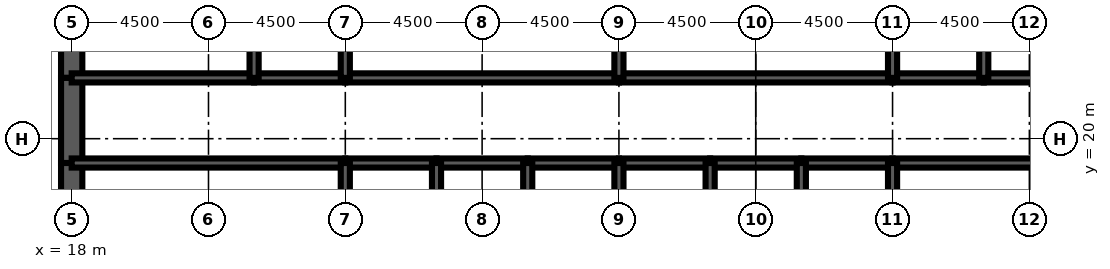
"""IFC4 building model, lengths in metres.
Left out: names, types, materials, properties, quantities, classifications, styles, units other than length and angle.
Written with IfcOpenShell. Run it as: python <this file> out.ifc"""

import sys

from ifc_helpers import new_model, si_unit, direction, frame, frame_2d, origin, place, context, subcontext, project, spatial, rectangle, extrude, element, fill, save


model = new_model("IFC4")
c1 = context("Model", 3, precision=1e-05, world=origin(), true_north=direction((0.0, 1.0)))
c2 = subcontext(c1, "Body", "Model", "MODEL_VIEW")
j1 = project(units=[si_unit("LENGTHUNIT", "METRE"), si_unit("PLANEANGLEUNIT", "RADIAN")], contexts=[c1])
p1 = place(None, origin())
s1 = spatial("IfcSite", under=j1, at=p1, CompositionType="ELEMENT")
p2 = place(p1, origin())
s2 = spatial("IfcBuilding", under=s1, at=p2, CompositionType="ELEMENT")
p3 = place(p2, frame((0.0, 0.0, 300.5)))
s3 = spatial("IfcBuildingStorey", under=s2, at=p3, CompositionType="ELEMENT", Elevation=300.5)
p4 = place(p3, frame((18.0, 26.0, 0.0), z_axis=(0.0, 0.0, 1.0), x_axis=(0.0, -1.0, 0.0)))
e1 = element("IfcWall", 1, at=p4, inside=s3, PredefinedType="SHEAR", context=c2, shape_type="SweptSolid", body=[
    extrude(rectangle(XDim=4.0, YDim=0.7, at=frame_2d((2.0, 0.0))), origin(), (0.0, 0.0, 1.0), 4.2),
])
p5 = place(p3, frame((18.0, 22.0, 0.0), z_axis=(0.0, 0.0, 1.0), x_axis=(0.0, -1.0, 0.0)))
e2 = element("IfcWall", 2, at=p5, inside=s3, PredefinedType="SHEAR", context=c2, shape_type="SweptSolid", body=[
    extrude(rectangle(XDim=2.8, YDim=0.7, at=frame_2d((1.4, 0.0))), origin(), (0.0, 0.0, 1.0), 4.2),
])
p6 = place(p5, frame((0.6, 0.0, 0.0)))
e3 = element("IfcOpeningElement", 3, at=p6, cuts=e2, PredefinedType="OPENING", context=c2, shape_type="SweptSolid", body=[
    extrude(rectangle(XDim=1.8, YDim=2.1, at=frame_2d((0.9, 1.05))), frame((0.0, 0.36, 0.0), z_axis=(0.0, -1.0, 0.0), x_axis=(1.0, 0.0, 0.0)), (0.0, 0.0, 1.0), 0.72),
])
p7 = place(p3, frame((18.0, 19.2, 0.0), z_axis=(0.0, 0.0, 1.0), x_axis=(0.0, -1.0, 0.0)))
e4 = element("IfcWall", 4, at=p7, inside=s3, PredefinedType="SHEAR", context=c2, shape_type="SweptSolid", body=[
    extrude(rectangle(XDim=3.2, YDim=0.7, at=frame_2d((1.6, 0.0))), origin(), (0.0, 0.0, 1.0), 4.2),
])
p8 = place(p3, frame((18.0, 19.2, 0.0), z_axis=(0.0, 0.0, 1.0), x_axis=(1.0, 0.0, 0.0)))
e5 = element("IfcWall", 5, at=p8, inside=s3, PredefinedType="SOLIDWALL", context=c2, shape_type="SweptSolid", body=[
    extrude(rectangle(XDim=9.0, YDim=0.3, at=frame_2d((4.5, 0.0))), origin(), (0.0, 0.0, 1.0), 4.2),
])
p9 = place(p8, frame((0.65, 0.0, 0.0)))
e6 = element("IfcOpeningElement", 6, at=p9, cuts=e5, PredefinedType="OPENING", context=c2, shape_type="SweptSolid", body=[
    extrude(rectangle(XDim=1.0, YDim=2.1, at=frame_2d((0.5, 1.05))), frame((0.0, 0.16, 0.0), z_axis=(0.0, -1.0, 0.0), x_axis=(1.0, 0.0, 0.0)), (0.0, 0.0, 1.0), 0.32),
])
p10 = place(p3, frame((27.0, 19.2, 0.0), z_axis=(0.0, 0.0, 1.0), x_axis=(1.0, 0.0, 0.0)))
e7 = element("IfcWall", 7, at=p10, inside=s3, PredefinedType="SOLIDWALL", context=c2, shape_type="SweptSolid", body=[
    extrude(rectangle(XDim=3.0, YDim=0.3, at=frame_2d((1.5, 0.0))), origin(), (0.0, 0.0, 1.0), 4.2),
])
p11 = place(p10, frame((0.95, 0.0, 0.0)))
e8 = element("IfcOpeningElement", 8, at=p11, cuts=e7, PredefinedType="OPENING", context=c2, shape_type="SweptSolid", body=[
    extrude(rectangle(XDim=1.1, YDim=2.2, at=frame_2d((0.55, 1.1))), frame((0.0, 0.16, 0.0), z_axis=(0.0, -1.0, 0.0), x_axis=(1.0, 0.0, 0.0)), (0.0, 0.0, 1.0), 0.32),
])
p12 = place(p3, frame((30.0, 19.2, 0.0), z_axis=(0.0, 0.0, 1.0), x_axis=(1.0, 0.0, 0.0)))
e9 = element("IfcWall", 9, at=p12, inside=s3, PredefinedType="SOLIDWALL", context=c2, shape_type="SweptSolid", body=[
    extrude(rectangle(XDim=3.0, YDim=0.3, at=frame_2d((1.5, 0.0))), origin(), (0.0, 0.0, 1.0), 4.2),
])
p13 = place(p12, frame((0.95, 0.0, 0.0)))
e10 = element("IfcOpeningElement", 10, at=p13, cuts=e9, PredefinedType="OPENING", context=c2, shape_type="SweptSolid", body=[
    extrude(rectangle(XDim=1.1, YDim=2.2, at=frame_2d((0.55, 1.1))), frame((0.0, 0.16, 0.0), z_axis=(0.0, -1.0, 0.0), x_axis=(1.0, 0.0, 0.0)), (0.0, 0.0, 1.0), 0.32),
])
p14 = place(p3, frame((33.0, 19.2, 0.0), z_axis=(0.0, 0.0, 1.0), x_axis=(1.0, 0.0, 0.0)))
e11 = element("IfcWall", 11, at=p14, inside=s3, PredefinedType="SOLIDWALL", context=c2, shape_type="SweptSolid", body=[
    extrude(rectangle(XDim=3.0, YDim=0.3, at=frame_2d((1.5, 0.0))), origin(), (0.0, 0.0, 1.0), 4.2),
])
p15 = place(p14, frame((0.95, 0.0, 0.0)))
e12 = element("IfcOpeningElement", 12, at=p15, cuts=e11, PredefinedType="OPENING", context=c2, shape_type="SweptSolid", body=[
    extrude(rectangle(XDim=1.1, YDim=2.2, at=frame_2d((0.55, 1.1))), frame((0.0, 0.16, 0.0), z_axis=(0.0, -1.0, 0.0), x_axis=(1.0, 0.0, 0.0)), (0.0, 0.0, 1.0), 0.32),
])
p16 = place(p3, frame((36.0, 19.2, 0.0), z_axis=(0.0, 0.0, 1.0), x_axis=(1.0, 0.0, 0.0)))
e13 = element("IfcWall", 13, at=p16, inside=s3, PredefinedType="SOLIDWALL", context=c2, shape_type="SweptSolid", body=[
    extrude(rectangle(XDim=3.0, YDim=0.3, at=frame_2d((1.5, 0.0))), origin(), (0.0, 0.0, 1.0), 4.2),
])
p17 = place(p16, frame((0.95, 0.0, 0.0)))
e14 = element("IfcOpeningElement", 14, at=p17, cuts=e13, PredefinedType="OPENING", context=c2, shape_type="SweptSolid", body=[
    extrude(rectangle(XDim=1.1, YDim=2.2, at=frame_2d((0.55, 1.1))), frame((0.0, 0.16, 0.0), z_axis=(0.0, -1.0, 0.0), x_axis=(1.0, 0.0, 0.0)), (0.0, 0.0, 1.0), 0.32),
])
p18 = place(p3, frame((39.0, 19.2, 0.0), z_axis=(0.0, 0.0, 1.0), x_axis=(1.0, 0.0, 0.0)))
e15 = element("IfcWall", 15, at=p18, inside=s3, PredefinedType="SOLIDWALL", context=c2, shape_type="SweptSolid", body=[
    extrude(rectangle(XDim=3.0, YDim=0.3, at=frame_2d((1.5, 0.0))), origin(), (0.0, 0.0, 1.0), 4.2),
])
p19 = place(p18, frame((1.0, 0.0, 0.0)))
e16 = element("IfcOpeningElement", 16, at=p19, cuts=e15, PredefinedType="OPENING", context=c2, shape_type="SweptSolid", body=[
    extrude(rectangle(XDim=1.0, YDim=2.1, at=frame_2d((0.5, 1.05))), frame((0.0, 0.16, 0.0), z_axis=(0.0, -1.0, 0.0), x_axis=(1.0, 0.0, 0.0)), (0.0, 0.0, 1.0), 0.32),
])
p20 = place(p3, frame((42.0, 19.2, 0.0), z_axis=(0.0, 0.0, 1.0), x_axis=(1.0, 0.0, 0.0)))
e17 = element("IfcWall", 17, at=p20, inside=s3, PredefinedType="SOLIDWALL", context=c2, shape_type="SweptSolid", body=[
    extrude(rectangle(XDim=3.0, YDim=0.3, at=frame_2d((1.5, 0.0))), origin(), (0.0, 0.0, 1.0), 4.2),
])
p21 = place(p20, frame((1.0, 0.0, 0.0)))
e18 = element("IfcOpeningElement", 18, at=p21, cuts=e17, PredefinedType="OPENING", context=c2, shape_type="SweptSolid", body=[
    extrude(rectangle(XDim=1.0, YDim=2.1, at=frame_2d((0.5, 1.05))), frame((0.0, 0.16, 0.0), z_axis=(0.0, -1.0, 0.0), x_axis=(1.0, 0.0, 0.0)), (0.0, 0.0, 1.0), 0.32),
])
p22 = place(p3, frame((45.0, 19.2, 0.0), z_axis=(0.0, 0.0, 1.0), x_axis=(1.0, 0.0, 0.0)))
e19 = element("IfcWall", 19, at=p22, inside=s3, PredefinedType="SOLIDWALL", context=c2, shape_type="SweptSolid", body=[
    extrude(rectangle(XDim=9.0, YDim=0.3, at=frame_2d((4.5, 0.0))), origin(), (0.0, 0.0, 1.0), 4.2),
])
p23 = place(p22, frame((7.35, 0.0, 0.0)))
e20 = element("IfcOpeningElement", 20, at=p23, cuts=e19, PredefinedType="OPENING", context=c2, shape_type="SweptSolid", body=[
    extrude(rectangle(XDim=1.0, YDim=2.1, at=frame_2d((0.5, 1.05))), frame((0.0, 0.16, 0.0), z_axis=(0.0, -1.0, 0.0), x_axis=(1.0, 0.0, 0.0)), (0.0, 0.0, 1.0), 0.32),
])
p24 = place(p3, frame((18.0, 22.0, 0.0), z_axis=(0.0, 0.0, 1.0), x_axis=(1.0, 0.0, 0.0)))
e21 = element("IfcWall", 21, at=p24, inside=s3, PredefinedType="SOLIDWALL", context=c2, shape_type="SweptSolid", body=[
    extrude(rectangle(XDim=6.0, YDim=0.3, at=frame_2d((3.0, 0.0))), origin(), (0.0, 0.0, 1.0), 4.2),
])
p25 = place(p24, frame((4.4, 0.0, 0.0)))
e22 = element("IfcOpeningElement", 22, at=p25, cuts=e21, PredefinedType="OPENING", context=c2, shape_type="SweptSolid", body=[
    extrude(rectangle(XDim=1.0, YDim=2.1, at=frame_2d((0.5, 1.05))), frame((0.0, 0.16, 0.0), z_axis=(0.0, -1.0, 0.0), x_axis=(1.0, 0.0, 0.0)), (0.0, 0.0, 1.0), 0.32),
])
p26 = place(p24, frame((0.75, 0.0, 0.0)))
e23 = element("IfcOpeningElement", 23, at=p26, cuts=e21, PredefinedType="OPENING", context=c2, shape_type="SweptSolid", body=[
    extrude(rectangle(XDim=1.0, YDim=2.1, at=frame_2d((0.5, 1.05))), frame((0.0, 0.16, 0.0), z_axis=(0.0, -1.0, 0.0), x_axis=(1.0, 0.0, 0.0)), (0.0, 0.0, 1.0), 0.32),
])
p27 = place(p3, frame((24.0, 22.0, 0.0), z_axis=(0.0, 0.0, 1.0), x_axis=(1.0, 0.0, 0.0)))
e24 = element("IfcWall", 24, at=p27, inside=s3, PredefinedType="SOLIDWALL", context=c2, shape_type="SweptSolid", body=[
    extrude(rectangle(XDim=3.0, YDim=0.3, at=frame_2d((1.5, 0.0))), origin(), (0.0, 0.0, 1.0), 4.2),
])
p28 = place(p27, frame((1.0, 0.0, 0.0)))
e25 = element("IfcOpeningElement", 25, at=p28, cuts=e24, PredefinedType="OPENING", context=c2, shape_type="SweptSolid", body=[
    extrude(rectangle(XDim=1.0, YDim=2.1, at=frame_2d((0.5, 1.05))), frame((0.0, 0.16, 0.0), z_axis=(0.0, -1.0, 0.0), x_axis=(1.0, 0.0, 0.0)), (0.0, 0.0, 1.0), 0.32),
])
p29 = place(p3, frame((27.0, 22.0, 0.0), z_axis=(0.0, 0.0, 1.0), x_axis=(1.0, 0.0, 0.0)))
e26 = element("IfcWall", 26, at=p29, inside=s3, PredefinedType="SOLIDWALL", context=c2, shape_type="SweptSolid", body=[
    extrude(rectangle(XDim=9.0, YDim=0.3, at=frame_2d((4.5, 0.0))), origin(), (0.0, 0.0, 1.0), 4.2),
])
p30 = place(p29, frame((4.0, 0.0, 0.0)))
e27 = element("IfcOpeningElement", 27, at=p30, cuts=e26, PredefinedType="OPENING", context=c2, shape_type="SweptSolid", body=[
    extrude(rectangle(XDim=1.0, YDim=2.1, at=frame_2d((0.5, 1.05))), frame((0.0, 0.16, 0.0), z_axis=(0.0, -1.0, 0.0), x_axis=(1.0, 0.0, 0.0)), (0.0, 0.0, 1.0), 0.32),
])
p31 = place(p3, frame((36.0, 22.0, 0.0), z_axis=(0.0, 0.0, 1.0), x_axis=(1.0, 0.0, 0.0)))
e28 = element("IfcWall", 28, at=p31, inside=s3, PredefinedType="SOLIDWALL", context=c2, shape_type="SweptSolid", body=[
    extrude(rectangle(XDim=9.0, YDim=0.3, at=frame_2d((4.5, 0.0))), origin(), (0.0, 0.0, 1.0), 4.2),
])
p32 = place(p31, frame((4.0, 0.0, 0.0)))
e29 = element("IfcOpeningElement", 29, at=p32, cuts=e28, PredefinedType="OPENING", context=c2, shape_type="SweptSolid", body=[
    extrude(rectangle(XDim=1.0, YDim=2.1, at=frame_2d((0.5, 1.05))), frame((0.0, 0.16, 0.0), z_axis=(0.0, -1.0, 0.0), x_axis=(1.0, 0.0, 0.0)), (0.0, 0.0, 1.0), 0.32),
])
p33 = place(p3, frame((45.0, 22.0, 0.0), z_axis=(0.0, 0.0, 1.0), x_axis=(1.0, 0.0, 0.0)))
e30 = element("IfcWall", 30, at=p33, inside=s3, PredefinedType="SOLIDWALL", context=c2, shape_type="SweptSolid", body=[
    extrude(rectangle(XDim=3.0, YDim=0.3, at=frame_2d((1.5, 0.0))), origin(), (0.0, 0.0, 1.0), 4.2),
])
p34 = place(p33, frame((1.0, 0.0, 0.0)))
e31 = element("IfcOpeningElement", 31, at=p34, cuts=e30, PredefinedType="OPENING", context=c2, shape_type="SweptSolid", body=[
    extrude(rectangle(XDim=1.0, YDim=2.1, at=frame_2d((0.5, 1.05))), frame((0.0, 0.16, 0.0), z_axis=(0.0, -1.0, 0.0), x_axis=(1.0, 0.0, 0.0)), (0.0, 0.0, 1.0), 0.32),
])
p35 = place(p3, frame((48.0, 22.0, 0.0), z_axis=(0.0, 0.0, 1.0), x_axis=(1.0, 0.0, 0.0)))
e32 = element("IfcWall", 32, at=p35, inside=s3, PredefinedType="SOLIDWALL", context=c2, shape_type="SweptSolid", body=[
    extrude(rectangle(XDim=6.0, YDim=0.3, at=frame_2d((3.0, 0.0))), origin(), (0.0, 0.0, 1.0), 4.2),
])
p36 = place(p35, frame((2.0, 0.0, 0.0)))
e33 = element("IfcOpeningElement", 33, at=p36, cuts=e32, PredefinedType="OPENING", context=c2, shape_type="SweptSolid", body=[
    extrude(rectangle(XDim=1.0, YDim=2.1, at=frame_2d((0.5, 1.05))), frame((0.0, 0.16, 0.0), z_axis=(0.0, -1.0, 0.0), x_axis=(1.0, 0.0, 0.0)), (0.0, 0.0, 1.0), 0.32),
])
p37 = place(p35, frame((4.1, 0.0, 0.0)))
e34 = element("IfcOpeningElement", 34, at=p37, cuts=e32, PredefinedType="OPENING", context=c2, shape_type="SweptSolid", body=[
    extrude(rectangle(XDim=1.0, YDim=2.1, at=frame_2d((0.5, 1.05))), frame((0.0, 0.16, 0.0), z_axis=(0.0, -1.0, 0.0), x_axis=(1.0, 0.0, 0.0)), (0.0, 0.0, 1.0), 0.32),
])
for number, where, z_axis, x_axis in (
    (35, (27.0, 16.0, 0.0), (0.0, 0.0, 1.0), (0.0, 1.0, 0.0)),
    (36, (30.0, 16.0, 0.0), (0.0, 0.0, 1.0), (0.0, 1.0, 0.0)),
    (37, (33.0, 16.0, 0.0), (0.0, 0.0, 1.0), (0.0, 1.0, 0.0)),
    (38, (36.0, 16.0, 0.0), (0.0, 0.0, 1.0), (0.0, 1.0, 0.0)),
    (39, (39.0, 16.0, 0.0), (0.0, 0.0, 1.0), (0.0, 1.0, 0.0)),
    (40, (42.0, 16.0, 0.0), (0.0, 0.0, 1.0), (0.0, 1.0, 0.0)),
    (41, (45.0, 16.0, 0.0), (0.0, 0.0, 1.0), (0.0, 1.0, 0.0)),
):
    element("IfcWall", number, at=place(p3, frame(where, z_axis=z_axis, x_axis=x_axis)), inside=s3, PredefinedType="SOLIDWALL", context=c2, shape_type="SweptSolid", body=[
        extrude(rectangle(XDim=3.2, YDim=0.3, at=frame_2d((1.6, 0.0))), origin(), (0.0, 0.0, 1.0), 4.2),
    ])
for number, where, z_axis, x_axis in (
    (42, (24.0, 22.0, 0.0), (0.0, 0.0, 1.0), (0.0, 1.0, 0.0)),
    (43, (27.0, 22.0, 0.0), (0.0, 0.0, 1.0), (0.0, 1.0, 0.0)),
    (44, (36.0, 22.0, 0.0), (0.0, 0.0, 1.0), (0.0, 1.0, 0.0)),
    (45, (45.0, 22.0, 0.0), (0.0, 0.0, 1.0), (0.0, 1.0, 0.0)),
    (46, (48.0, 22.0, 0.0), (0.0, 0.0, 1.0), (0.0, 1.0, 0.0)),
):
    element("IfcWall", number, at=place(p3, frame(where, z_axis=z_axis, x_axis=x_axis)), inside=s3, PredefinedType="SOLIDWALL", context=c2, shape_type="SweptSolid", body=[
        extrude(rectangle(XDim=4.0, YDim=0.3, at=frame_2d((2.0, 0.0))), origin(), (0.0, 0.0, 1.0), 4.2),
    ])
p38 = place(p3, frame((42.0, 22.15, 0.0), z_axis=(0.0, 0.0, 1.0), x_axis=(0.0, 1.0, 0.0)))
e47 = element("IfcWall", 47, at=p38, inside=s3, PredefinedType="PARTITIONING", context=c2, shape_type="SweptSolid", body=[
    extrude(rectangle(XDim=3.7, YDim=0.15, at=frame_2d((1.85, 0.0))), origin(), (0.0, 0.0, 1.0), 3.0),
])
p39 = place(p38, frame((2.2, 0.0, 0.0)))
e48 = element("IfcOpeningElement", 48, at=p39, cuts=e47, PredefinedType="OPENING", context=c2, shape_type="SweptSolid", body=[
    extrude(rectangle(XDim=1.0, YDim=2.1, at=frame_2d((0.5, 1.05))), frame((0.0, 0.085, 0.0), z_axis=(0.0, -1.0, 0.0), x_axis=(1.0, 0.0, 0.0)), (0.0, 0.0, 1.0), 0.17),
])
p40 = place(p3, frame((20.225, 22.15, 0.0), z_axis=(0.0, 0.0, 1.0), x_axis=(0.0, 1.0, 0.0)))
e49 = element("IfcWall", 49, at=p40, inside=s3, PredefinedType="PARTITIONING", context=c2, shape_type="SweptSolid", body=[
    extrude(rectangle(XDim=3.7, YDim=0.15, at=frame_2d((1.85, 0.0))), origin(), (0.0, 0.0, 1.0), 3.0),
])
p41 = place(p3, frame((48.6, 19.35, 0.0), z_axis=(0.0, 0.0, 1.0), x_axis=(0.0, 1.0, 0.0)))
e50 = element("IfcWall", 50, at=p41, inside=s3, PredefinedType="PARTITIONING", context=c2, shape_type="SweptSolid", body=[
    extrude(rectangle(XDim=2.5, YDim=0.15, at=frame_2d((1.25, 0.0))), origin(), (0.0, 0.0, 1.0), 3.0),
])
p42 = place(p41, frame((1.15, 0.0, 0.0)))
e51 = element("IfcOpeningElement", 51, at=p42, cuts=e50, PredefinedType="OPENING", context=c2, shape_type="SweptSolid", body=[
    extrude(rectangle(XDim=1.0, YDim=2.1, at=frame_2d((0.5, 1.05))), frame((0.0, 0.085, 0.0), z_axis=(0.0, -1.0, 0.0), x_axis=(1.0, 0.0, 0.0)), (0.0, 0.0, 1.0), 0.17),
])
p43 = place(p42, origin())
e52 = element("IfcDoor", 52, at=p43, inside=s3, OperationType="SINGLE_SWING_RIGHT", PredefinedType="DOOR", context=c2, shape_type="SweptSolid", body=[
    extrude(rectangle(XDim=1.0, YDim=2.1, at=frame_2d((0.5, 1.05))), frame((0.0, 0.025, 0.0), z_axis=(0.0, -1.0, 0.0), x_axis=(1.0, 0.0, 0.0)), (0.0, 0.0, 1.0), 0.05),
])
fill(e51, e52)
p44 = place(p11, origin())
e53 = element("IfcDoor", 53, at=p44, inside=s3, OperationType="DOUBLE_DOOR_SLIDING", PredefinedType="USERDEFINED", context=c2, shape_type="SweptSolid", body=[
    extrude(rectangle(XDim=1.1, YDim=2.2, at=frame_2d((0.55, 1.1))), frame((0.0, 0.025, 0.0), z_axis=(0.0, -1.0, 0.0), x_axis=(1.0, 0.0, 0.0)), (0.0, 0.0, 1.0), 0.05),
])
fill(e8, e53)
p45 = place(p13, origin())
e54 = element("IfcDoor", 54, at=p45, inside=s3, OperationType="DOUBLE_DOOR_SLIDING", PredefinedType="USERDEFINED", context=c2, shape_type="SweptSolid", body=[
    extrude(rectangle(XDim=1.1, YDim=2.2, at=frame_2d((0.55, 1.1))), frame((0.0, 0.025, 0.0), z_axis=(0.0, -1.0, 0.0), x_axis=(1.0, 0.0, 0.0)), (0.0, 0.0, 1.0), 0.05),
])
fill(e10, e54)
p46 = place(p15, origin())
e55 = element("IfcDoor", 55, at=p46, inside=s3, OperationType="DOUBLE_DOOR_SLIDING", PredefinedType="USERDEFINED", context=c2, shape_type="SweptSolid", body=[
    extrude(rectangle(XDim=1.1, YDim=2.2, at=frame_2d((0.55, 1.1))), frame((0.0, 0.025, 0.0), z_axis=(0.0, -1.0, 0.0), x_axis=(1.0, 0.0, 0.0)), (0.0, 0.0, 1.0), 0.05),
])
fill(e12, e55)
p47 = place(p17, origin())
e56 = element("IfcDoor", 56, at=p47, inside=s3, OperationType="DOUBLE_DOOR_SLIDING", PredefinedType="USERDEFINED", context=c2, shape_type="SweptSolid", body=[
    extrude(rectangle(XDim=1.1, YDim=2.2, at=frame_2d((0.55, 1.1))), frame((0.0, 0.025, 0.0), z_axis=(0.0, -1.0, 0.0), x_axis=(1.0, 0.0, 0.0)), (0.0, 0.0, 1.0), 0.05),
])
fill(e14, e56)
p48 = place(p9, origin())
e57 = element("IfcDoor", 57, at=p48, inside=s3, OperationType="SINGLE_SWING_LEFT", PredefinedType="DOOR", context=c2, shape_type="SweptSolid", body=[
    extrude(rectangle(XDim=1.0, YDim=2.1, at=frame_2d((0.5, 1.05))), frame((0.0, 0.025, 0.0), z_axis=(0.0, -1.0, 0.0), x_axis=(1.0, 0.0, 0.0)), (0.0, 0.0, 1.0), 0.05),
])
fill(e6, e57)
p49 = place(p6, origin())
e58 = element("IfcDoor", 58, at=p49, inside=s3, OperationType="SINGLE_SWING_LEFT", PredefinedType="DOOR", context=c2, shape_type="SweptSolid", body=[
    extrude(rectangle(XDim=1.8, YDim=2.1, at=frame_2d((0.9, 1.05))), frame((0.0, 0.35, 0.0), z_axis=(0.0, -1.0, 0.0), x_axis=(1.0, 0.0, 0.0)), (0.0, 0.0, 1.0), 0.699),
])
fill(e3, e58)
p50 = place(p25, origin())
e59 = element("IfcDoor", 59, at=p50, inside=s3, OperationType="SINGLE_SWING_RIGHT", PredefinedType="DOOR", context=c2, shape_type="SweptSolid", body=[
    extrude(rectangle(XDim=1.0, YDim=2.1, at=frame_2d((0.5, 1.05))), frame((0.0, 0.025, 0.0), z_axis=(0.0, -1.0, 0.0), x_axis=(1.0, 0.0, 0.0)), (0.0, 0.0, 1.0), 0.05),
])
fill(e22, e59)
p51 = place(p28, origin())
e60 = element("IfcDoor", 60, at=p51, inside=s3, OperationType="SINGLE_SWING_LEFT", PredefinedType="DOOR", context=c2, shape_type="SweptSolid", body=[
    extrude(rectangle(XDim=1.0, YDim=2.1, at=frame_2d((0.5, 1.05))), frame((0.0, 0.025, 0.0), z_axis=(0.0, -1.0, 0.0), x_axis=(1.0, 0.0, 0.0)), (0.0, 0.0, 1.0), 0.05),
])
fill(e25, e60)
p52 = place(p30, origin())
e61 = element("IfcDoor", 61, at=p52, inside=s3, OperationType="SINGLE_SWING_LEFT", PredefinedType="DOOR", context=c2, shape_type="SweptSolid", body=[
    extrude(rectangle(XDim=1.0, YDim=2.1, at=frame_2d((0.5, 1.05))), frame((0.0, 0.025, 0.0), z_axis=(0.0, -1.0, 0.0), x_axis=(1.0, 0.0, 0.0)), (0.0, 0.0, 1.0), 0.05),
])
fill(e27, e61)
p53 = place(p32, origin())
e62 = element("IfcDoor", 62, at=p53, inside=s3, OperationType="SINGLE_SWING_LEFT", PredefinedType="DOOR", context=c2, shape_type="SweptSolid", body=[
    extrude(rectangle(XDim=1.0, YDim=2.1, at=frame_2d((0.5, 1.05))), frame((0.0, 0.025, 0.0), z_axis=(0.0, -1.0, 0.0), x_axis=(1.0, 0.0, 0.0)), (0.0, 0.0, 1.0), 0.05),
])
fill(e29, e62)
p54 = place(p34, origin())
e63 = element("IfcDoor", 63, at=p54, inside=s3, OperationType="SINGLE_SWING_LEFT", PredefinedType="DOOR", context=c2, shape_type="SweptSolid", body=[
    extrude(rectangle(XDim=1.0, YDim=2.1, at=frame_2d((0.5, 1.05))), frame((0.0, 0.025, 0.0), z_axis=(0.0, -1.0, 0.0), x_axis=(1.0, 0.0, 0.0)), (0.0, 0.0, 1.0), 0.05),
])
fill(e31, e63)
p55 = place(p26, origin())
e64 = element("IfcDoor", 64, at=p55, inside=s3, OperationType="SINGLE_SWING_LEFT", PredefinedType="DOOR", context=c2, shape_type="SweptSolid", body=[
    extrude(rectangle(XDim=1.0, YDim=2.1, at=frame_2d((0.5, 1.05))), frame((0.0, 0.025, 0.0), z_axis=(0.0, -1.0, 0.0), x_axis=(1.0, 0.0, 0.0)), (0.0, 0.0, 1.0), 0.05),
])
fill(e23, e64)
p56 = place(p19, origin())
e65 = element("IfcDoor", 65, at=p56, inside=s3, OperationType="SINGLE_SWING_LEFT", PredefinedType="DOOR", context=c2, shape_type="SweptSolid", body=[
    extrude(rectangle(XDim=1.0, YDim=2.1, at=frame_2d((0.5, 1.05))), frame((0.0, 0.025, 0.0), z_axis=(0.0, -1.0, 0.0), x_axis=(1.0, 0.0, 0.0)), (0.0, 0.0, 1.0), 0.05),
])
fill(e16, e65)
p57 = place(p21, origin())
e66 = element("IfcDoor", 66, at=p57, inside=s3, OperationType="SINGLE_SWING_LEFT", PredefinedType="DOOR", context=c2, shape_type="SweptSolid", body=[
    extrude(rectangle(XDim=1.0, YDim=2.1, at=frame_2d((0.5, 1.05))), frame((0.0, 0.025, 0.0), z_axis=(0.0, -1.0, 0.0), x_axis=(1.0, 0.0, 0.0)), (0.0, 0.0, 1.0), 0.05),
])
fill(e18, e66)
save(model, sys.argv[1])
